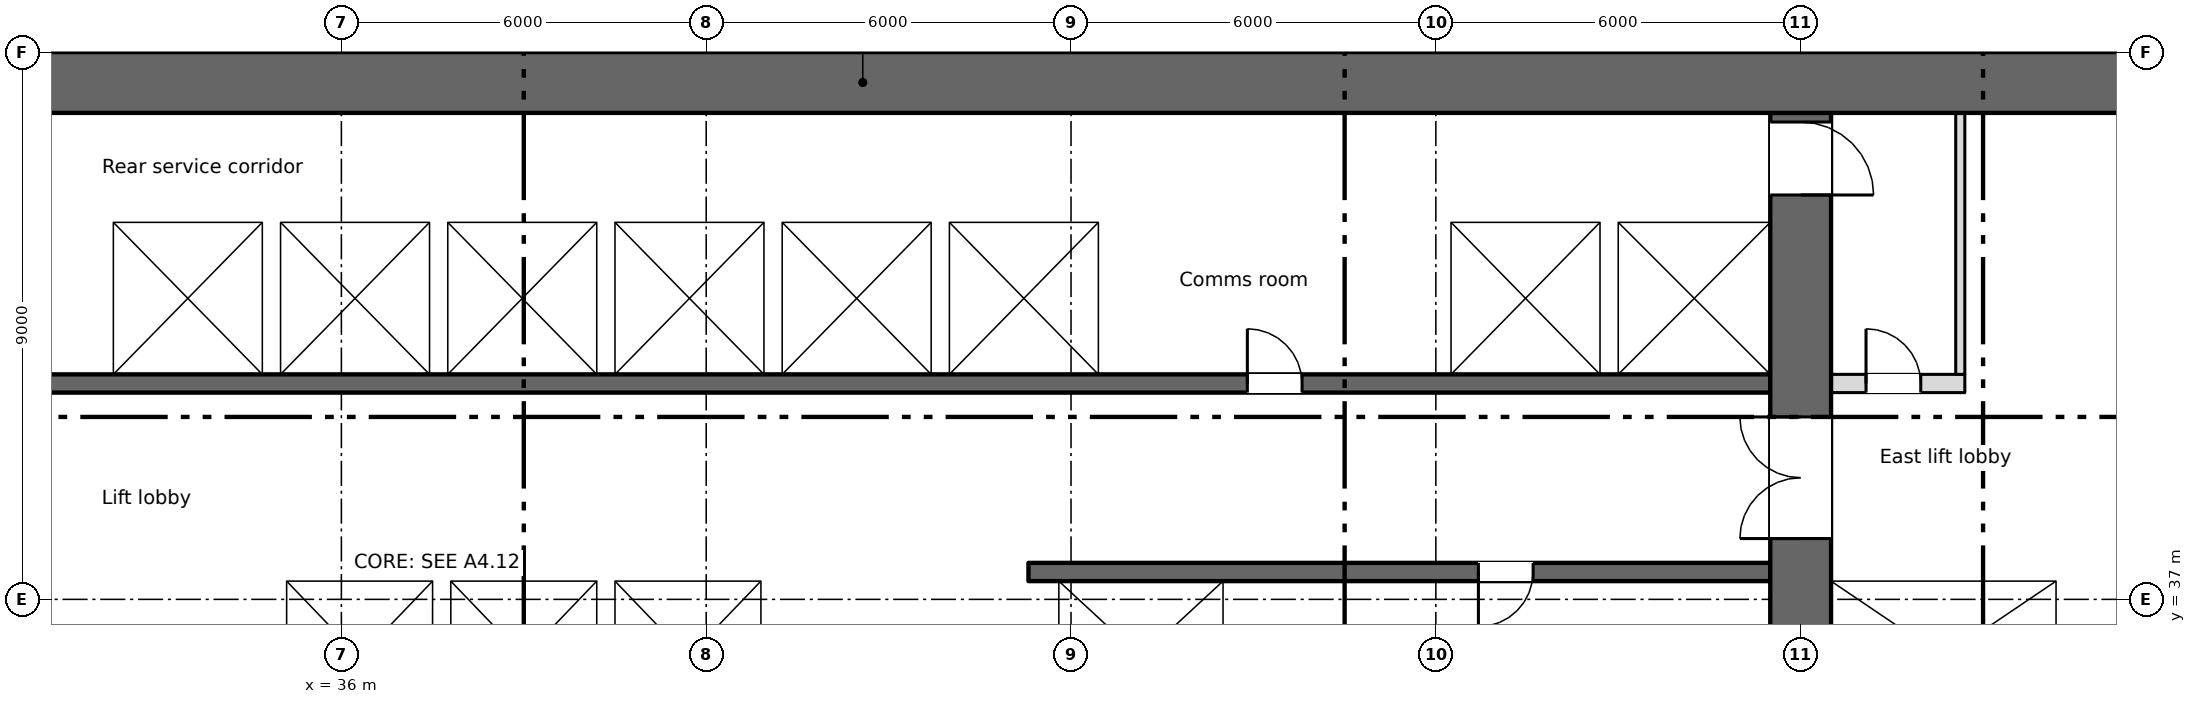
"""IFC4 building model, lengths in metres.
Left out: names, types, materials, properties, quantities, classifications, styles, units other than length and angle.
Written with IfcOpenShell. Run it as: python <this file> out.ifc"""

import sys

from ifc_helpers import new_model, si_unit, direction, frame, frame_2d, origin, place, context, subcontext, project, spatial, rectangle, extrude, element, fill, save


model = new_model("IFC4")
c1 = context("Model", 3, precision=1e-05, world=origin(), true_north=direction((0.0, 1.0)))
c2 = subcontext(c1, "Body", "Model", "MODEL_VIEW")
j1 = project(units=[si_unit("LENGTHUNIT", "METRE"), si_unit("PLANEANGLEUNIT", "RADIAN")], contexts=[c1])
p1 = place(None, origin())
s1 = spatial("IfcSite", under=j1, at=p1, CompositionType="ELEMENT")
p2 = place(p1, origin())
s2 = spatial("IfcBuilding", under=s1, at=p2, CompositionType="ELEMENT")
p3 = place(p2, frame((0.0, 0.0, 75.0)))
s3 = spatial("IfcBuildingStorey", under=s2, at=p3, CompositionType="ELEMENT", Elevation=75.0)
p4 = place(p3, frame((5.55, 45.5, 0.0), z_axis=(0.0, 0.0, 1.0), x_axis=(1.0, 0.0, 0.0)))
e1 = element("IfcWall", 1, at=p4, inside=s3, PredefinedType="SHEAR", context=c2, shape_type="SweptSolid", body=[
    extrude(rectangle(XDim=66.9, YDim=1.0, at=frame_2d((33.45, 0.0))), origin(), (0.0, 0.0, 1.0), 3.35),
])
p5 = place(p4, frame((7.2, 0.0, 0.6)))
e2 = element("IfcOpeningElement", 2, at=p5, cuts=e1, PredefinedType="OPENING", context=c2, shape_type="SweptSolid", body=[
    extrude(rectangle(XDim=0.6, YDim=2.4, at=frame_2d((0.3, 1.2))), frame((0.0, 0.51, 0.0), z_axis=(0.0, -1.0, 0.0), x_axis=(1.0, 0.0, 0.0)), (0.0, 0.0, 1.0), 1.02),
])
p6 = place(p4, frame((61.2, 0.0, 0.6)))
e3 = element("IfcOpeningElement", 3, at=p6, cuts=e1, PredefinedType="OPENING", context=c2, shape_type="SweptSolid", body=[
    extrude(rectangle(XDim=0.6, YDim=2.4, at=frame_2d((0.3, 1.2))), frame((0.0, 0.51, 0.0), z_axis=(0.0, -1.0, 0.0), x_axis=(1.0, 0.0, 0.0)), (0.0, 0.0, 1.0), 1.02),
])
p7 = place(p3, frame((64.35, 34.8, 0.0), z_axis=(0.0, 0.0, 1.0), x_axis=(0.0, 1.0, 0.0)))
e4 = element("IfcWall", 4, at=p7, inside=s3, PredefinedType="SHEAR", context=c2, shape_type="SweptSolid", body=[
    extrude(rectangle(XDim=10.2, YDim=0.3, at=frame_2d((5.1, 0.0))), origin(), (0.0, 0.0, 1.0), 3.35),
])
p8 = place(p3, frame((60.0, 28.4, 0.0), z_axis=(0.0, 0.0, 1.0), x_axis=(0.0, 1.0, 0.0)))
e5 = element("IfcWall", 5, at=p8, inside=s3, PredefinedType="SHEAR", context=c2, shape_type="SweptSolid", body=[
    extrude(rectangle(XDim=16.6, YDim=1.0, at=frame_2d((8.3, 0.0))), origin(), (0.0, 0.0, 1.0), 3.35),
])
p9 = place(p8, frame((9.6, 0.0, 0.0)))
e6 = element("IfcOpeningElement", 6, at=p9, cuts=e5, PredefinedType="OPENING", context=c2, shape_type="SweptSolid", body=[
    extrude(rectangle(XDim=2.0, YDim=2.1, at=frame_2d((1.0, 1.05))), frame((0.0, 0.51, 0.0), z_axis=(0.0, -1.0, 0.0), x_axis=(1.0, 0.0, 0.0)), (0.0, 0.0, 1.0), 1.02),
])
p10 = place(p8, frame((15.25, 0.0, 0.0)))
e7 = element("IfcOpeningElement", 7, at=p10, cuts=e5, PredefinedType="OPENING", context=c2, shape_type="SweptSolid", body=[
    extrude(rectangle(XDim=1.2, YDim=2.1, at=frame_2d((0.6, 1.05))), frame((0.0, 0.51, 0.0), z_axis=(0.0, -1.0, 0.0), x_axis=(1.0, 0.0, 0.0)), (0.0, 0.0, 1.0), 1.02),
])
p11 = place(p3, frame((34.8, 37.45, 0.0), z_axis=(0.0, 0.0, 1.0), x_axis=(1.0, 0.0, 0.0)))
e8 = element("IfcWall", 8, at=p11, inside=s3, PredefinedType="SHEAR", context=c2, shape_type="SweptSolid", body=[
    extrude(rectangle(XDim=8.4, YDim=0.3, at=frame_2d((4.2, 0.0))), origin(), (0.0, 0.0, 1.0), 3.35),
])
p12 = place(p11, frame((0.95, 0.0, 0.0)))
e9 = element("IfcOpeningElement", 9, at=p12, cuts=e8, PredefinedType="OPENING", context=c2, shape_type="SweptSolid", body=[
    extrude(rectangle(XDim=1.1, YDim=2.1, at=frame_2d((0.55, 1.05))), frame((0.0, 0.16, 0.0), z_axis=(0.0, -1.0, 0.0), x_axis=(1.0, 0.0, 0.0)), (0.0, 0.0, 1.0), 0.32),
])
p13 = place(p11, frame((3.65, 0.0, 0.0)))
e10 = element("IfcOpeningElement", 10, at=p13, cuts=e8, PredefinedType="OPENING", context=c2, shape_type="SweptSolid", body=[
    extrude(rectangle(XDim=1.1, YDim=2.1, at=frame_2d((0.55, 1.05))), frame((0.0, 0.16, 0.0), z_axis=(0.0, -1.0, 0.0), x_axis=(1.0, 0.0, 0.0)), (0.0, 0.0, 1.0), 0.32),
])
p14 = place(p11, frame((6.35, 0.0, 0.0)))
e11 = element("IfcOpeningElement", 11, at=p14, cuts=e8, PredefinedType="OPENING", context=c2, shape_type="SweptSolid", body=[
    extrude(rectangle(XDim=1.1, YDim=2.1, at=frame_2d((0.55, 1.05))), frame((0.0, 0.16, 0.0), z_axis=(0.0, -1.0, 0.0), x_axis=(1.0, 0.0, 0.0)), (0.0, 0.0, 1.0), 0.32),
])
p15 = place(p3, frame((59.5, 37.45, 0.0), z_axis=(0.0, 0.0, 1.0), x_axis=(-1.0, 0.0, 0.0)))
e12 = element("IfcWall", 12, at=p15, inside=s3, PredefinedType="SHEAR", context=c2, shape_type="SweptSolid", body=[
    extrude(rectangle(XDim=12.2, YDim=0.3, at=frame_2d((6.1, 0.0))), origin(), (0.0, 0.0, 1.0), 3.35),
])
p16 = place(p15, frame((3.9, 0.0, 0.0)))
e13 = element("IfcOpeningElement", 13, at=p16, cuts=e12, PredefinedType="OPENING", context=c2, shape_type="SweptSolid", body=[
    extrude(rectangle(XDim=0.9, YDim=2.1, at=frame_2d((0.45, 1.05))), frame((0.0, 0.16, 0.0), z_axis=(0.0, -1.0, 0.0), x_axis=(1.0, 0.0, 0.0)), (0.0, 0.0, 1.0), 0.32),
])
p17 = place(p3, frame((60.5, 37.45, 0.0), z_axis=(0.0, 0.0, 1.0), x_axis=(1.0, 0.0, 0.0)))
e14 = element("IfcWall", 14, at=p17, inside=s3, PredefinedType="SHEAR", context=c2, shape_type="SweptSolid", body=[
    extrude(rectangle(XDim=3.7, YDim=0.3, at=frame_2d((1.85, 0.0))), origin(), (0.0, 0.0, 1.0), 3.35),
])
p18 = place(p17, frame((1.3, 0.0, 0.0)))
e15 = element("IfcOpeningElement", 15, at=p18, cuts=e14, PredefinedType="OPENING", context=c2, shape_type="SweptSolid", body=[
    extrude(rectangle(XDim=1.1, YDim=2.1, at=frame_2d((0.55, 1.05))), frame((0.0, 0.16, 0.0), z_axis=(0.0, -1.0, 0.0), x_axis=(1.0, 0.0, 0.0)), (0.0, 0.0, 1.0), 0.32),
])
for number, where, z_axis, x_axis in (
    (16, (34.95, 34.8, 0.0), (0.0, 0.0, 1.0), (0.0, 1.0, 0.0)),
    (17, (43.05, 34.8, 0.0), (0.0, 0.0, 1.0), (0.0, 1.0, 0.0)),
):
    element("IfcWall", number, at=place(p3, frame(where, z_axis=z_axis, x_axis=x_axis)), inside=s3, PredefinedType="SHEAR", context=c2, shape_type="SweptSolid", body=[
        extrude(rectangle(XDim=2.5, YDim=0.3, at=frame_2d((1.25, 0.0))), origin(), (0.0, 0.0, 1.0), 3.35),
    ])
p19 = place(p3, frame((47.55, 34.8, 0.0), z_axis=(0.0, 0.0, 1.0), x_axis=(0.0, 1.0, 0.0)))
e18 = element("IfcWall", 18, at=p19, inside=s3, PredefinedType="SHEAR", context=c2, shape_type="SweptSolid", body=[
    extrude(rectangle(XDim=2.5, YDim=0.5, at=frame_2d((1.25, 0.0))), origin(), (0.0, 0.0, 1.0), 3.35),
])
p20 = place(p3, frame((50.65, 34.8, 0.0), z_axis=(0.0, 0.0, 1.0), x_axis=(0.0, 1.0, 0.0)))
e19 = element("IfcWall", 19, at=p20, inside=s3, PredefinedType="SHEAR", context=c2, shape_type="SweptSolid", body=[
    extrude(rectangle(XDim=2.5, YDim=0.3, at=frame_2d((1.25, 0.0))), origin(), (0.0, 0.0, 1.0), 3.35),
])
p21 = place(p3, frame((18.5, 40.55, 0.0), z_axis=(0.0, 0.0, 1.0), x_axis=(1.0, 0.0, 0.0)))
e20 = element("IfcWall", 20, at=p21, inside=s3, PredefinedType="SHEAR", context=c2, shape_type="SweptSolid", body=[
    extrude(rectangle(XDim=41.0, YDim=0.3, at=frame_2d((20.5, 0.0))), origin(), (0.0, 0.0, 1.0), 3.35),
])
p22 = place(p21, frame((9.025, 0.0, 0.0)))
e21 = element("IfcOpeningElement", 21, at=p22, cuts=e20, PredefinedType="OPENING", context=c2, shape_type="SweptSolid", body=[
    extrude(rectangle(XDim=0.9, YDim=2.1, at=frame_2d((0.45, 1.05))), frame((0.0, 0.16, 0.0), z_axis=(0.0, -1.0, 0.0), x_axis=(1.0, 0.0, 0.0)), (0.0, 0.0, 1.0), 0.32),
])
p23 = place(p21, frame((32.4, 0.0, 0.0)))
e22 = element("IfcOpeningElement", 22, at=p23, cuts=e20, PredefinedType="OPENING", context=c2, shape_type="SweptSolid", body=[
    extrude(rectangle(XDim=0.9, YDim=2.1, at=frame_2d((0.45, 1.05))), frame((0.0, 0.16, 0.0), z_axis=(0.0, -1.0, 0.0), x_axis=(1.0, 0.0, 0.0)), (0.0, 0.0, 1.0), 0.32),
])
p24 = place(p21, frame((14.425, 0.0, 0.0)))
e23 = element("IfcOpeningElement", 23, at=p24, cuts=e20, PredefinedType="OPENING", context=c2, shape_type="SweptSolid", body=[
    extrude(rectangle(XDim=1.1, YDim=2.1, at=frame_2d((0.55, 1.05))), frame((0.0, 0.16, 0.0), z_axis=(0.0, -1.0, 0.0), x_axis=(1.0, 0.0, 0.0)), (0.0, 0.0, 1.0), 0.32),
])
p25 = place(p21, frame((17.175, 0.0, 0.0)))
e24 = element("IfcOpeningElement", 24, at=p25, cuts=e20, PredefinedType="OPENING", context=c2, shape_type="SweptSolid", body=[
    extrude(rectangle(XDim=1.1, YDim=2.1, at=frame_2d((0.55, 1.05))), frame((0.0, 0.16, 0.0), z_axis=(0.0, -1.0, 0.0), x_axis=(1.0, 0.0, 0.0)), (0.0, 0.0, 1.0), 0.32),
])
p26 = place(p21, frame((19.925, 0.0, 0.0)))
e25 = element("IfcOpeningElement", 25, at=p26, cuts=e20, PredefinedType="OPENING", context=c2, shape_type="SweptSolid", body=[
    extrude(rectangle(XDim=1.1, YDim=2.1, at=frame_2d((0.55, 1.05))), frame((0.0, 0.16, 0.0), z_axis=(0.0, -1.0, 0.0), x_axis=(1.0, 0.0, 0.0)), (0.0, 0.0, 1.0), 0.32),
])
p27 = place(p21, frame((22.675, 0.0, 0.0)))
e26 = element("IfcOpeningElement", 26, at=p27, cuts=e20, PredefinedType="OPENING", context=c2, shape_type="SweptSolid", body=[
    extrude(rectangle(XDim=1.1, YDim=2.1, at=frame_2d((0.55, 1.05))), frame((0.0, 0.16, 0.0), z_axis=(0.0, -1.0, 0.0), x_axis=(1.0, 0.0, 0.0)), (0.0, 0.0, 1.0), 0.32),
])
p28 = place(p21, frame((36.375, 0.0, 0.0)))
e27 = element("IfcOpeningElement", 27, at=p28, cuts=e20, PredefinedType="OPENING", context=c2, shape_type="SweptSolid", body=[
    extrude(rectangle(XDim=1.2, YDim=2.1, at=frame_2d((0.6, 1.05))), frame((0.0, 0.16, 0.0), z_axis=(0.0, -1.0, 0.0), x_axis=(1.0, 0.0, 0.0)), (0.0, 0.0, 1.0), 0.32),
])
p29 = place(p21, frame((39.15, 0.0, 0.0)))
e28 = element("IfcOpeningElement", 28, at=p29, cuts=e20, PredefinedType="OPENING", context=c2, shape_type="SweptSolid", body=[
    extrude(rectangle(XDim=1.2, YDim=2.1, at=frame_2d((0.6, 1.05))), frame((0.0, 0.16, 0.0), z_axis=(0.0, -1.0, 0.0), x_axis=(1.0, 0.0, 0.0)), (0.0, 0.0, 1.0), 0.32),
])
p30 = place(p3, frame((18.5, 43.35, 0.0), z_axis=(0.0, 0.0, 1.0), x_axis=(1.0, 0.0, 0.0)))
e29 = element("IfcWall", 29, at=p30, inside=s3, PredefinedType="SHEAR", context=c2, shape_type="SweptSolid", body=[
    extrude(rectangle(XDim=41.0, YDim=0.3, at=frame_2d((20.5, 0.0))), origin(), (0.0, 0.0, 1.0), 3.35),
])
p31 = place(p3, frame((60.5, 40.55, 0.0), z_axis=(0.0, 0.0, 1.0), x_axis=(1.0, 0.0, 0.0)))
e30 = element("IfcWall", 30, at=p31, inside=s3, PredefinedType="PARTITIONING", context=c2, shape_type="SweptSolid", body=[
    extrude(rectangle(XDim=2.2, YDim=0.3, at=frame_2d((1.1, 0.0))), origin(), (0.0, 0.0, 1.0), 3.35),
])
p32 = place(p31, frame((0.575, 0.0, 0.0)))
e31 = element("IfcOpeningElement", 31, at=p32, cuts=e30, PredefinedType="OPENING", context=c2, shape_type="SweptSolid", body=[
    extrude(rectangle(XDim=0.9, YDim=2.1, at=frame_2d((0.45, 1.05))), frame((0.0, 0.16, 0.0), z_axis=(0.0, -1.0, 0.0), x_axis=(1.0, 0.0, 0.0)), (0.0, 0.0, 1.0), 0.32),
])
for number, where, z_axis, x_axis in (
    (32, (37.65, 34.8, 0.0), (0.0, 0.0, 1.0), (0.0, 1.0, 0.0)),
    (33, (40.35, 34.8, 0.0), (0.0, 0.0, 1.0), (0.0, 1.0, 0.0)),
    (34, (32.1, 40.7, 0.0), (0.0, 0.0, 1.0), (0.0, 1.0, 0.0)),
    (35, (34.85, 40.7, 0.0), (0.0, 0.0, 1.0), (0.0, 1.0, 0.0)),
    (36, (37.6, 40.7, 0.0), (0.0, 0.0, 1.0), (0.0, 1.0, 0.0)),
    (37, (40.35, 40.7, 0.0), (0.0, 0.0, 1.0), (0.0, 1.0, 0.0)),
    (38, (43.1, 40.7, 0.0), (0.0, 0.0, 1.0), (0.0, 1.0, 0.0)),
    (39, (45.85, 40.7, 0.0), (0.0, 0.0, 1.0), (0.0, 1.0, 0.0)),
    (40, (48.6, 40.7, 0.0), (0.0, 0.0, 1.0), (0.0, 1.0, 0.0)),
    (41, (54.1, 40.7, 0.0), (0.0, 0.0, 1.0), (0.0, 1.0, 0.0)),
    (42, (56.85, 40.7, 0.0), (0.0, 0.0, 1.0), (0.0, 1.0, 0.0)),
):
    element("IfcWall", number, at=place(p3, frame(where, z_axis=z_axis, x_axis=x_axis)), inside=s3, PredefinedType="SHEAR", context=c2, shape_type="SweptSolid", body=[
        extrude(rectangle(XDim=2.5, YDim=0.3, at=frame_2d((1.25, 0.0))), origin(), (0.0, 0.0, 1.0), 3.35),
    ])
p33 = place(p3, frame((62.625, 40.7, 0.0), z_axis=(0.0, 0.0, 1.0), x_axis=(0.0, 1.0, 0.0)))
e43 = element("IfcWall", 43, at=p33, inside=s3, PredefinedType="PARTITIONING", context=c2, shape_type="SweptSolid", body=[
    extrude(rectangle(XDim=4.3, YDim=0.15, at=frame_2d((2.15, 0.0))), origin(), (0.0, 0.0, 1.0), 3.35),
])
p34 = place(p32, origin())
e44 = element("IfcDoor", 44, at=p34, inside=s3, OperationType="SINGLE_SWING_LEFT", PredefinedType="DOOR", context=c2, shape_type="SweptSolid", body=[
    extrude(rectangle(XDim=0.9, YDim=2.1, at=frame_2d((0.45, 1.05))), frame((0.0, 0.025, 0.0), z_axis=(0.0, -1.0, 0.0), x_axis=(1.0, 0.0, 0.0)), (0.0, 0.0, 1.0), 0.05),
])
fill(e31, e44)
p35 = place(p16, origin())
e45 = element("IfcDoor", 45, at=p35, inside=s3, OperationType="SINGLE_SWING_RIGHT", PredefinedType="DOOR", context=c2, shape_type="SweptSolid", body=[
    extrude(rectangle(XDim=0.9, YDim=2.1, at=frame_2d((0.45, 1.05))), frame((0.0, 0.025, 0.0), z_axis=(0.0, -1.0, 0.0), x_axis=(1.0, 0.0, 0.0)), (0.0, 0.0, 1.0), 0.05),
])
fill(e13, e45)
p36 = place(p23, origin())
e46 = element("IfcDoor", 46, at=p36, inside=s3, OperationType="SINGLE_SWING_LEFT", PredefinedType="DOOR", context=c2, shape_type="SweptSolid", body=[
    extrude(rectangle(XDim=0.9, YDim=2.1, at=frame_2d((0.45, 1.05))), frame((0.0, 0.025, 0.0), z_axis=(0.0, -1.0, 0.0), x_axis=(1.0, 0.0, 0.0)), (0.0, 0.0, 1.0), 0.05),
])
fill(e22, e46)
p37 = place(p12, origin())
e47 = element("IfcDoor", 47, at=p37, inside=s3, OperationType="SLIDING_TO_LEFT", PredefinedType="DOOR", context=c2, shape_type="SweptSolid", body=[
    extrude(rectangle(XDim=1.1, YDim=2.1, at=frame_2d((0.55, 1.05))), frame((0.0, 0.025, 0.0), z_axis=(0.0, -1.0, 0.0), x_axis=(1.0, 0.0, 0.0)), (0.0, 0.0, 1.0), 0.05),
])
fill(e9, e47)
p38 = place(p13, origin())
e48 = element("IfcDoor", 48, at=p38, inside=s3, OperationType="SLIDING_TO_LEFT", PredefinedType="DOOR", context=c2, shape_type="SweptSolid", body=[
    extrude(rectangle(XDim=1.1, YDim=2.1, at=frame_2d((0.55, 1.05))), frame((0.0, 0.025, 0.0), z_axis=(0.0, -1.0, 0.0), x_axis=(1.0, 0.0, 0.0)), (0.0, 0.0, 1.0), 0.05),
])
fill(e10, e48)
p39 = place(p14, origin())
e49 = element("IfcDoor", 49, at=p39, inside=s3, OperationType="SLIDING_TO_LEFT", PredefinedType="DOOR", context=c2, shape_type="SweptSolid", body=[
    extrude(rectangle(XDim=1.1, YDim=2.1, at=frame_2d((0.55, 1.05))), frame((0.0, 0.025, 0.0), z_axis=(0.0, -1.0, 0.0), x_axis=(1.0, 0.0, 0.0)), (0.0, 0.0, 1.0), 0.05),
])
fill(e11, e49)
p40 = place(p24, origin())
e50 = element("IfcDoor", 50, at=p40, inside=s3, OperationType="SLIDING_TO_LEFT", PredefinedType="DOOR", context=c2, shape_type="SweptSolid", body=[
    extrude(rectangle(XDim=1.1, YDim=2.1, at=frame_2d((0.55, 1.05))), frame((0.0, 0.025, 0.0), z_axis=(0.0, -1.0, 0.0), x_axis=(1.0, 0.0, 0.0)), (0.0, 0.0, 1.0), 0.05),
])
fill(e23, e50)
p41 = place(p25, origin())
e51 = element("IfcDoor", 51, at=p41, inside=s3, OperationType="SLIDING_TO_LEFT", PredefinedType="DOOR", context=c2, shape_type="SweptSolid", body=[
    extrude(rectangle(XDim=1.1, YDim=2.1, at=frame_2d((0.55, 1.05))), frame((0.0, 0.025, 0.0), z_axis=(0.0, -1.0, 0.0), x_axis=(1.0, 0.0, 0.0)), (0.0, 0.0, 1.0), 0.05),
])
fill(e24, e51)
p42 = place(p26, origin())
e52 = element("IfcDoor", 52, at=p42, inside=s3, OperationType="SLIDING_TO_LEFT", PredefinedType="DOOR", context=c2, shape_type="SweptSolid", body=[
    extrude(rectangle(XDim=1.1, YDim=2.1, at=frame_2d((0.55, 1.05))), frame((0.0, 0.025, 0.0), z_axis=(0.0, -1.0, 0.0), x_axis=(1.0, 0.0, 0.0)), (0.0, 0.0, 1.0), 0.05),
])
fill(e25, e52)
p43 = place(p27, origin())
e53 = element("IfcDoor", 53, at=p43, inside=s3, OperationType="SLIDING_TO_LEFT", PredefinedType="DOOR", context=c2, shape_type="SweptSolid", body=[
    extrude(rectangle(XDim=1.1, YDim=2.1, at=frame_2d((0.55, 1.05))), frame((0.0, 0.025, 0.0), z_axis=(0.0, -1.0, 0.0), x_axis=(1.0, 0.0, 0.0)), (0.0, 0.0, 1.0), 0.05),
])
fill(e26, e53)
p44 = place(p28, origin())
e54 = element("IfcDoor", 54, at=p44, inside=s3, OperationType="SLIDING_TO_LEFT", PredefinedType="DOOR", context=c2, shape_type="SweptSolid", body=[
    extrude(rectangle(XDim=1.2, YDim=2.1, at=frame_2d((0.6, 1.05))), frame((0.0, 0.025, 0.0), z_axis=(0.0, -1.0, 0.0), x_axis=(1.0, 0.0, 0.0)), (0.0, 0.0, 1.0), 0.05),
])
fill(e27, e54)
p45 = place(p29, origin())
e55 = element("IfcDoor", 55, at=p45, inside=s3, OperationType="SLIDING_TO_LEFT", PredefinedType="DOOR", context=c2, shape_type="SweptSolid", body=[
    extrude(rectangle(XDim=1.2, YDim=2.1, at=frame_2d((0.6, 1.05))), frame((0.0, 0.025, 0.0), z_axis=(0.0, -1.0, 0.0), x_axis=(1.0, 0.0, 0.0)), (0.0, 0.0, 1.0), 0.05),
])
fill(e28, e55)
p46 = place(p18, origin())
e56 = element("IfcDoor", 56, at=p46, inside=s3, OperationType="SLIDING_TO_LEFT", PredefinedType="DOOR", context=c2, shape_type="SweptSolid", body=[
    extrude(rectangle(XDim=1.1, YDim=2.1, at=frame_2d((0.55, 1.05))), frame((0.0, 0.025, 0.0), z_axis=(0.0, -1.0, 0.0), x_axis=(1.0, 0.0, 0.0)), (0.0, 0.0, 1.0), 0.05),
])
fill(e15, e56)
p47 = place(p9, origin())
e57 = element("IfcDoor", 57, at=p47, inside=s3, OperationType="DOUBLE_DOOR_SINGLE_SWING", PredefinedType="DOOR", context=c2, shape_type="SweptSolid", body=[
    extrude(rectangle(XDim=2.0, YDim=2.1, at=frame_2d((1.0, 1.05))), frame((0.0, 0.025, 0.0), z_axis=(0.0, -1.0, 0.0), x_axis=(1.0, 0.0, 0.0)), (0.0, 0.0, 1.0), 0.05),
])
fill(e6, e57)
p48 = place(p10, origin())
e58 = element("IfcDoor", 58, at=p48, inside=s3, OperationType="SINGLE_SWING_LEFT", PredefinedType="DOOR", context=c2, shape_type="SweptSolid", body=[
    extrude(rectangle(XDim=1.2, YDim=2.1, at=frame_2d((0.6, 1.05))), frame((0.0, 0.025, 0.0), z_axis=(0.0, -1.0, 0.0), x_axis=(1.0, 0.0, 0.0)), (0.0, 0.0, 1.0), 0.05),
])
fill(e7, e58)
save(model, sys.argv[1])
